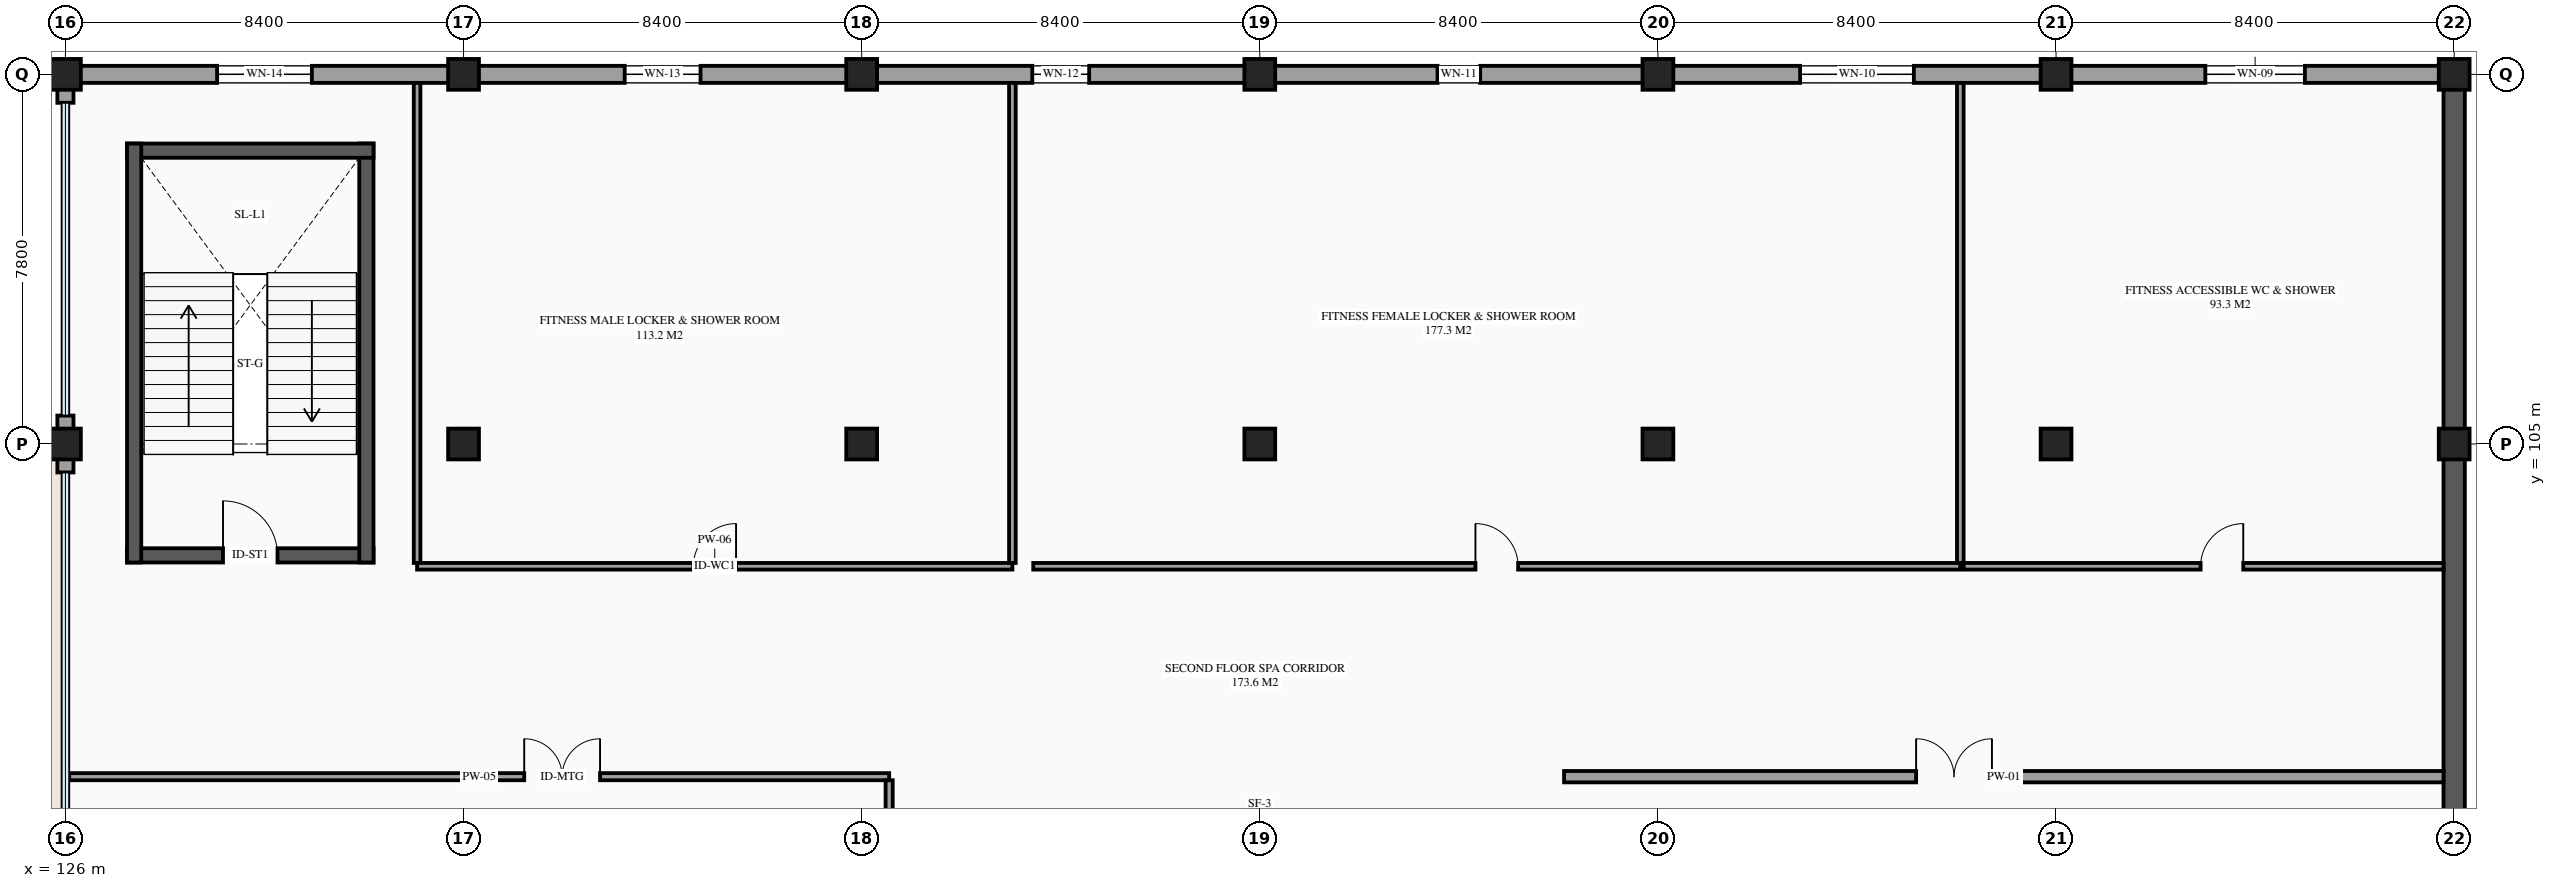
"""IFC4 building model, lengths in metres.
Left out: names, types, materials, properties, quantities, classifications, styles, units other than length and angle.
Written with IfcOpenShell. Run it as: python <this file> out.ifc"""

import sys

from ifc_helpers import new_model, si_unit, direction, frame, frame_2d, origin, origin_2d, place, context, subcontext, project, spatial, rectangle, extrude, element, fill, save


model = new_model("IFC4")
c1 = context("Model", 3, precision=1e-05, world=origin(), true_north=direction((0.0, 1.0)))
c2 = subcontext(c1, "Body", "Model", "MODEL_VIEW")
j1 = project(units=[si_unit("LENGTHUNIT", "METRE"), si_unit("PLANEANGLEUNIT", "RADIAN")], contexts=[c1])
p1 = place(None, origin())
s1 = spatial("IfcSite", under=j1, at=p1, CompositionType="ELEMENT")
p2 = place(p1, origin())
s2 = spatial("IfcBuilding", under=s1, at=p2, CompositionType="ELEMENT")
p3 = place(p2, frame((0.0, 0.0, 9.9)))
s3 = spatial("IfcBuildingStorey", under=s2, at=p3, CompositionType="ELEMENT", Elevation=9.9)
for number, where, z_axis, x_axis in (
    (1, (126.0, 105.0, 0.0), (0.0, 0.0, 1.0), (1.0, 0.0, 0.0)),
    (2, (126.0, 112.8, 0.0), (0.0, 0.0, 1.0), (1.0, 0.0, 0.0)),
    (3, (134.4, 105.0, 0.0), (0.0, 0.0, 1.0), (1.0, 0.0, 0.0)),
    (4, (134.4, 112.8, 0.0), (0.0, 0.0, 1.0), (1.0, 0.0, 0.0)),
    (5, (142.8, 105.0, 0.0), (0.0, 0.0, 1.0), (1.0, 0.0, 0.0)),
    (6, (142.8, 112.8, 0.0), (0.0, 0.0, 1.0), (1.0, 0.0, 0.0)),
    (7, (151.2, 105.0, 0.0), (0.0, 0.0, 1.0), (1.0, 0.0, 0.0)),
    (8, (151.2, 112.8, 0.0), (0.0, 0.0, 1.0), (1.0, 0.0, 0.0)),
    (9, (159.6, 105.0, 0.0), (0.0, 0.0, 1.0), (1.0, 0.0, 0.0)),
    (10, (159.6, 112.8, 0.0), (0.0, 0.0, 1.0), (1.0, 0.0, 0.0)),
    (11, (168.0, 105.0, 0.0), (0.0, 0.0, 1.0), (1.0, 0.0, 0.0)),
    (12, (168.0, 112.8, 0.0), (0.0, 0.0, 1.0), (1.0, 0.0, 0.0)),
    (13, (176.4, 105.0, 0.0), (0.0, 0.0, 1.0), (1.0, 0.0, 0.0)),
    (14, (176.4, 112.8, 0.0), (0.0, 0.0, 1.0), (1.0, 0.0, 0.0)),
):
    element("IfcColumn", number, at=place(p3, frame(where, z_axis=z_axis, x_axis=x_axis)), inside=s3, PredefinedType="COLUMN", context=c2, shape_type="SweptSolid", body=[
        extrude(rectangle(XDim=0.65, YDim=0.65, at=origin_2d()), origin(), (0.0, 0.0, 1.0), 4.2),
    ])
p4 = place(p3, frame((176.4, 96.6, 0.0), z_axis=(0.0, 0.0, 1.0), x_axis=(0.0, 1.0, 0.0)))
e15 = element("IfcWall", 15, at=p4, inside=s3, PredefinedType="STANDARD", context=c2, shape_type="SweptSolid", body=[
    extrude(rectangle(XDim=8.4, YDim=0.45, at=frame_2d((4.2, 0.0))), origin(), (0.0, 0.0, 1.0), 4.2),
])
p5 = place(p3, frame((176.4, 105.0, 0.0), z_axis=(0.0, 0.0, 1.0), x_axis=(0.0, 1.0, 0.0)))
e16 = element("IfcWall", 16, at=p5, inside=s3, PredefinedType="STANDARD", context=c2, shape_type="SweptSolid", body=[
    extrude(rectangle(XDim=7.8, YDim=0.45, at=frame_2d((3.9, 0.0))), origin(), (0.0, 0.0, 1.0), 4.2),
])
p6 = place(p3, frame((176.4, 112.8, 0.0), z_axis=(0.0, 0.0, 1.0), x_axis=(-1.0, 0.0, 0.0)))
e17 = element("IfcWall", 17, at=p6, inside=s3, PredefinedType="STANDARD", context=c2, shape_type="SweptSolid", body=[
    extrude(rectangle(XDim=8.4, YDim=0.36, at=frame_2d((4.2, 0.0))), origin(), (0.0, 0.0, 1.0), 3.427),
])
p7 = place(p6, frame((3.15, 0.0, 0.8)))
e18 = element("IfcOpeningElement", 18, at=p7, cuts=e17, PredefinedType="OPENING", context=c2, shape_type="SweptSolid", body=[
    extrude(rectangle(XDim=2.1, YDim=1.5, at=frame_2d((1.05, 0.75))), frame((0.0, 0.19, 0.0), z_axis=(0.0, -1.0, 0.0), x_axis=(1.0, 0.0, 0.0)), (0.0, 0.0, 1.0), 0.38),
])
p8 = place(p3, frame((168.0, 112.8, 0.0), z_axis=(0.0, 0.0, 1.0), x_axis=(-1.0, 0.0, 0.0)))
e19 = element("IfcWall", 19, at=p8, inside=s3, PredefinedType="STANDARD", context=c2, shape_type="SweptSolid", body=[
    extrude(rectangle(XDim=8.4, YDim=0.36, at=frame_2d((4.2, 0.0))), origin(), (0.0, 0.0, 1.0), 3.65),
])
p9 = place(p8, frame((3.0, 0.0, 0.8)))
e20 = element("IfcOpeningElement", 20, at=p9, cuts=e19, PredefinedType="OPENING", context=c2, shape_type="SweptSolid", body=[
    extrude(rectangle(XDim=2.4, YDim=1.5, at=frame_2d((1.2, 0.75))), frame((0.0, 0.19, 0.0), z_axis=(0.0, -1.0, 0.0), x_axis=(1.0, 0.0, 0.0)), (0.0, 0.0, 1.0), 0.38),
])
p10 = place(p3, frame((159.6, 112.8, 0.0), z_axis=(0.0, 0.0, 1.0), x_axis=(-1.0, 0.0, 0.0)))
e21 = element("IfcWall", 21, at=p10, inside=s3, PredefinedType="STANDARD", context=c2, shape_type="SweptSolid", body=[
    extrude(rectangle(XDim=8.4, YDim=0.36, at=frame_2d((4.2, 0.0))), origin(), (0.0, 0.0, 1.0), 3.01),
])
p11 = place(p10, frame((3.75, 0.0, 0.8)))
e22 = element("IfcOpeningElement", 22, at=p11, cuts=e21, PredefinedType="OPENING", context=c2, shape_type="SweptSolid", body=[
    extrude(rectangle(XDim=0.9, YDim=1.5, at=frame_2d((0.45, 0.75))), frame((0.0, 0.19, 0.0), z_axis=(0.0, -1.0, 0.0), x_axis=(1.0, 0.0, 0.0)), (0.0, 0.0, 1.0), 0.38),
])
p12 = place(p3, frame((151.2, 112.8, 0.0), z_axis=(0.0, 0.0, 1.0), x_axis=(-1.0, 0.0, 0.0)))
e23 = element("IfcWall", 23, at=p12, inside=s3, PredefinedType="STANDARD", context=c2, shape_type="SweptSolid", body=[
    extrude(rectangle(XDim=8.4, YDim=0.36, at=frame_2d((4.2, 0.0))), origin(), (0.0, 0.0, 1.0), 3.606),
])
p13 = place(p12, frame((3.6, 0.0, 0.8)))
e24 = element("IfcOpeningElement", 24, at=p13, cuts=e23, PredefinedType="OPENING", context=c2, shape_type="SweptSolid", body=[
    extrude(rectangle(XDim=1.2, YDim=1.5, at=frame_2d((0.6, 0.75))), frame((0.0, 0.19, 0.0), z_axis=(0.0, -1.0, 0.0), x_axis=(1.0, 0.0, 0.0)), (0.0, 0.0, 1.0), 0.38),
])
p14 = place(p3, frame((142.8, 112.8, 0.0), z_axis=(0.0, 0.0, 1.0), x_axis=(-1.0, 0.0, 0.0)))
e25 = element("IfcWall", 25, at=p14, inside=s3, PredefinedType="STANDARD", context=c2, shape_type="SweptSolid", body=[
    extrude(rectangle(XDim=8.4, YDim=0.36, at=frame_2d((4.2, 0.0))), origin(), (0.0, 0.0, 1.0), 3.655),
])
p15 = place(p14, frame((3.4, 0.0, 0.8)))
e26 = element("IfcOpeningElement", 26, at=p15, cuts=e25, PredefinedType="OPENING", context=c2, shape_type="SweptSolid", body=[
    extrude(rectangle(XDim=1.6, YDim=1.5, at=frame_2d((0.8, 0.75))), frame((0.0, 0.19, 0.0), z_axis=(0.0, -1.0, 0.0), x_axis=(1.0, 0.0, 0.0)), (0.0, 0.0, 1.0), 0.38),
])
p16 = place(p3, frame((134.4, 112.8, 0.0), z_axis=(0.0, 0.0, 1.0), x_axis=(-1.0, 0.0, 0.0)))
e27 = element("IfcWall", 27, at=p16, inside=s3, PredefinedType="STANDARD", context=c2, shape_type="SweptSolid", body=[
    extrude(rectangle(XDim=8.4, YDim=0.36, at=frame_2d((4.2, 0.0))), origin(), (0.0, 0.0, 1.0), 3.31),
])
p17 = place(p16, frame((3.2, 0.0, 0.8)))
e28 = element("IfcOpeningElement", 28, at=p17, cuts=e27, PredefinedType="OPENING", context=c2, shape_type="SweptSolid", body=[
    extrude(rectangle(XDim=2.0, YDim=1.5, at=frame_2d((1.0, 0.75))), frame((0.0, 0.19, 0.0), z_axis=(0.0, -1.0, 0.0), x_axis=(1.0, 0.0, 0.0)), (0.0, 0.0, 1.0), 0.38),
])
p18 = place(p3, frame((126.0, 105.0, 0.0), z_axis=(0.0, 0.0, 1.0), x_axis=(0.0, -1.0, 0.0)))
e29 = element("IfcWall", 29, at=p18, inside=s3, PredefinedType="STANDARD", context=c2, shape_type="SweptSolid", body=[
    extrude(rectangle(XDim=0.6, YDim=0.34, at=frame_2d((0.3, 0.0))), origin(), (0.0, 0.0, 1.0), 4.2),
])
p19 = place(p3, frame((126.0, 112.62, 0.0), z_axis=(0.0, 0.0, 1.0), x_axis=(0.0, -1.0, 0.0)))
e30 = element("IfcWall", 30, at=p19, inside=s3, PredefinedType="STANDARD", context=c2, shape_type="SweptSolid", body=[
    extrude(rectangle(XDim=0.42, YDim=0.34, at=frame_2d((0.21, 0.0))), origin(), (0.0, 0.0, 1.0), 4.2),
])
p20 = place(p3, frame((126.0, 105.6, 0.0), z_axis=(0.0, 0.0, 1.0), x_axis=(0.0, -1.0, 0.0)))
e31 = element("IfcWall", 31, at=p20, inside=s3, PredefinedType="STANDARD", context=c2, shape_type="SweptSolid", body=[
    extrude(rectangle(XDim=0.6, YDim=0.34, at=frame_2d((0.3, 0.0))), origin(), (0.0, 0.0, 1.0), 4.2),
])
p21 = place(p3, frame((127.3, 102.65, 0.0), z_axis=(0.0, 0.0, 1.0), x_axis=(1.0, 0.0, 0.0)))
e32 = element("IfcWall", 32, at=p21, inside=s3, PredefinedType="SHEAR", context=c2, shape_type="SweptSolid", body=[
    extrude(rectangle(XDim=5.2, YDim=0.3, at=frame_2d((2.6, 0.0))), origin(), (0.0, 0.0, 1.0), 4.2),
])
p22 = place(p21, frame((2.025, 0.0, 0.0)))
e33 = element("IfcOpeningElement", 33, at=p22, cuts=e32, PredefinedType="OPENING", context=c2, shape_type="SweptSolid", body=[
    extrude(rectangle(XDim=1.15, YDim=2.15, at=frame_2d((0.575, 1.075))), frame((0.0, 0.16, 0.0), z_axis=(0.0, -1.0, 0.0), x_axis=(1.0, 0.0, 0.0)), (0.0, 0.0, 1.0), 0.32),
])
p23 = place(p3, frame((132.35, 102.5, 0.0), z_axis=(0.0, 0.0, 1.0), x_axis=(0.0, 1.0, 0.0)))
e34 = element("IfcWall", 34, at=p23, inside=s3, PredefinedType="SHEAR", context=c2, shape_type="SweptSolid", body=[
    extrude(rectangle(XDim=8.84, YDim=0.3, at=frame_2d((4.42, 0.0))), origin(), (0.0, 0.0, 1.0), 4.2),
])
p24 = place(p3, frame((132.5, 111.19, 0.0), z_axis=(0.0, 0.0, 1.0), x_axis=(-1.0, 0.0, 0.0)))
e35 = element("IfcWall", 35, at=p24, inside=s3, PredefinedType="SHEAR", context=c2, shape_type="SweptSolid", body=[
    extrude(rectangle(XDim=5.2, YDim=0.3, at=frame_2d((2.6, 0.0))), origin(), (0.0, 0.0, 1.0), 4.2),
])
p25 = place(p3, frame((127.45, 111.34, 0.0), z_axis=(0.0, 0.0, 1.0), x_axis=(0.0, -1.0, 0.0)))
e36 = element("IfcWall", 36, at=p25, inside=s3, PredefinedType="SHEAR", context=c2, shape_type="SweptSolid", body=[
    extrude(rectangle(XDim=8.84, YDim=0.3, at=frame_2d((4.42, 0.0))), origin(), (0.0, 0.0, 1.0), 4.2),
])
p26 = place(p3, frame((126.08, 97.98, 0.0), z_axis=(0.0, 0.0, 1.0), x_axis=(1.0, 0.0, 0.0)))
e37 = element("IfcWall", 37, at=p26, inside=s3, PredefinedType="PARTITIONING", context=c2, shape_type="SweptSolid", body=[
    extrude(rectangle(XDim=17.3, YDim=0.15, at=frame_2d((8.65, 0.0))), origin(), (0.0, 0.0, 1.0), 3.955),
])
p27 = place(p26, frame((9.6, 0.0, 0.0)))
e38 = element("IfcOpeningElement", 38, at=p27, cuts=e37, PredefinedType="OPENING", context=c2, shape_type="SweptSolid", body=[
    extrude(rectangle(XDim=1.6, YDim=2.25, at=frame_2d((0.8, 1.125))), frame((0.0, 0.085, 0.0), z_axis=(0.0, -1.0, 0.0), x_axis=(1.0, 0.0, 0.0)), (0.0, 0.0, 1.0), 0.17),
])
p28 = place(p3, frame((143.38, 80.42, 0.0), z_axis=(0.0, 0.0, 1.0), x_axis=(0.0, 1.0, 0.0)))
e39 = element("IfcWall", 39, at=p28, inside=s3, PredefinedType="PARTITIONING", context=c2, shape_type="SweptSolid", body=[
    extrude(rectangle(XDim=17.485, YDim=0.15, at=frame_2d((8.743, 0.0))), origin(), (0.0, 0.0, 1.0), 3.955),
])
p29 = place(p3, frame((157.62, 97.98, 0.0), z_axis=(0.0, 0.0, 1.0), x_axis=(1.0, 0.0, 0.0)))
e40 = element("IfcWall", 40, at=p29, inside=s3, PredefinedType="PARTITIONING", context=c2, shape_type="SweptSolid", body=[
    extrude(rectangle(XDim=18.555, YDim=0.24, at=frame_2d((9.277, 0.0))), origin(), (0.0, 0.0, 1.0), 3.955),
])
p30 = place(p29, frame((7.427, 0.0, 0.0)))
e41 = element("IfcOpeningElement", 41, at=p30, cuts=e40, PredefinedType="OPENING", context=c2, shape_type="SweptSolid", body=[
    extrude(rectangle(XDim=1.6, YDim=2.25, at=frame_2d((0.8, 1.125))), frame((0.0, 0.13, 0.0), z_axis=(0.0, -1.0, 0.0), x_axis=(1.0, 0.0, 0.0)), (0.0, 0.0, 1.0), 0.26),
])
p31 = place(p3, frame((133.42, 102.42, 0.0), z_axis=(0.0, 0.0, 1.0), x_axis=(1.0, 0.0, 0.0)))
e42 = element("IfcWall", 42, at=p31, inside=s3, PredefinedType="PARTITIONING", context=c2, shape_type="SweptSolid", body=[
    extrude(rectangle(XDim=12.56, YDim=0.14, at=frame_2d((6.28, 0.0))), origin(), (0.0, 0.0, 1.0), 3.955),
])
p32 = place(p31, frame((5.83, 0.0, 0.0)))
e43 = element("IfcOpeningElement", 43, at=p32, cuts=e42, PredefinedType="OPENING", context=c2, shape_type="SweptSolid", body=[
    extrude(rectangle(XDim=0.9, YDim=2.12, at=frame_2d((0.45, 1.06))), frame((0.0, 0.08, 0.0), z_axis=(0.0, -1.0, 0.0), x_axis=(1.0, 0.0, 0.0)), (0.0, 0.0, 1.0), 0.16),
])
for number, where, z_axis, x_axis in (
    (44, (133.42, 102.49, 0.0), (0.0, 0.0, 1.0), (0.0, 1.0, 0.0)),
    (45, (145.98, 102.49, 0.0), (0.0, 0.0, 1.0), (0.0, 1.0, 0.0)),
):
    element("IfcWall", number, at=place(p3, frame(where, z_axis=z_axis, x_axis=x_axis)), inside=s3, PredefinedType="PARTITIONING", context=c2, shape_type="SweptSolid", body=[
        extrude(rectangle(XDim=10.13, YDim=0.14, at=frame_2d((5.065, 0.0))), origin(), (0.0, 0.0, 1.0), 3.955),
    ])
p33 = place(p3, frame((146.42, 102.42, 0.0), z_axis=(0.0, 0.0, 1.0), x_axis=(1.0, 0.0, 0.0)))
e46 = element("IfcWall", 46, at=p33, inside=s3, PredefinedType="PARTITIONING", context=c2, shape_type="SweptSolid", body=[
    extrude(rectangle(XDim=19.56, YDim=0.14, at=frame_2d((9.78, 0.0))), origin(), (0.0, 0.0, 1.0), 3.955),
])
p34 = place(p33, frame((9.33, 0.0, 0.0)))
e47 = element("IfcOpeningElement", 47, at=p34, cuts=e46, PredefinedType="OPENING", context=c2, shape_type="SweptSolid", body=[
    extrude(rectangle(XDim=0.9, YDim=2.12, at=frame_2d((0.45, 1.06))), frame((0.0, 0.08, 0.0), z_axis=(0.0, -1.0, 0.0), x_axis=(1.0, 0.0, 0.0)), (0.0, 0.0, 1.0), 0.16),
])
p35 = place(p3, frame((165.98, 102.49, 0.0), z_axis=(0.0, 0.0, 1.0), x_axis=(0.0, 1.0, 0.0)))
e48 = element("IfcWall", 48, at=p35, inside=s3, PredefinedType="PARTITIONING", context=c2, shape_type="SweptSolid", body=[
    extrude(rectangle(XDim=10.13, YDim=0.14, at=frame_2d((5.065, 0.0))), origin(), (0.0, 0.0, 1.0), 3.955),
])
p36 = place(p3, frame((166.05, 102.42, 0.0), z_axis=(0.0, 0.0, 1.0), x_axis=(1.0, 0.0, 0.0)))
e49 = element("IfcWall", 49, at=p36, inside=s3, PredefinedType="PARTITIONING", context=c2, shape_type="SweptSolid", body=[
    extrude(rectangle(XDim=10.125, YDim=0.14, at=frame_2d((5.062, 0.0))), origin(), (0.0, 0.0, 1.0), 3.955),
])
p37 = place(p36, frame((5.0, 0.0, 0.0)))
e50 = element("IfcOpeningElement", 50, at=p37, cuts=e49, PredefinedType="OPENING", context=c2, shape_type="SweptSolid", body=[
    extrude(rectangle(XDim=0.9, YDim=2.12, at=frame_2d((0.45, 1.06))), frame((0.0, 0.08, 0.0), z_axis=(0.0, -1.0, 0.0), x_axis=(1.0, 0.0, 0.0)), (0.0, 0.0, 1.0), 0.16),
])
p38 = place(p7, origin())
e51 = element("IfcWindow", 51, at=p38, inside=s3, PartitioningType="SINGLE_PANEL", PredefinedType="WINDOW", context=c2, shape_type="SweptSolid", body=[
    extrude(rectangle(XDim=2.1, YDim=1.5, at=frame_2d((1.05, 0.75))), frame((0.0, 0.03, 0.0), z_axis=(0.0, -1.0, 0.0), x_axis=(1.0, 0.0, 0.0)), (0.0, 0.0, 1.0), 0.06),
])
fill(e18, e51)
p39 = place(p9, origin())
e52 = element("IfcWindow", 52, at=p39, inside=s3, PartitioningType="SINGLE_PANEL", PredefinedType="WINDOW", context=c2, shape_type="SweptSolid", body=[
    extrude(rectangle(XDim=2.4, YDim=1.5, at=frame_2d((1.2, 0.75))), frame((0.0, 0.03, 0.0), z_axis=(0.0, -1.0, 0.0), x_axis=(1.0, 0.0, 0.0)), (0.0, 0.0, 1.0), 0.06),
])
fill(e20, e52)
p40 = place(p11, origin())
e53 = element("IfcWindow", 53, at=p40, inside=s3, PartitioningType="SINGLE_PANEL", PredefinedType="WINDOW", context=c2, shape_type="SweptSolid", body=[
    extrude(rectangle(XDim=0.9, YDim=1.5, at=frame_2d((0.45, 0.75))), frame((0.0, 0.03, 0.0), z_axis=(0.0, -1.0, 0.0), x_axis=(1.0, 0.0, 0.0)), (0.0, 0.0, 1.0), 0.06),
])
fill(e22, e53)
p41 = place(p13, origin())
e54 = element("IfcWindow", 54, at=p41, inside=s3, PartitioningType="SINGLE_PANEL", PredefinedType="WINDOW", context=c2, shape_type="SweptSolid", body=[
    extrude(rectangle(XDim=1.2, YDim=1.5, at=frame_2d((0.6, 0.75))), frame((0.0, 0.03, 0.0), z_axis=(0.0, -1.0, 0.0), x_axis=(1.0, 0.0, 0.0)), (0.0, 0.0, 1.0), 0.06),
])
fill(e24, e54)
p42 = place(p15, origin())
e55 = element("IfcWindow", 55, at=p42, inside=s3, PartitioningType="SINGLE_PANEL", PredefinedType="WINDOW", context=c2, shape_type="SweptSolid", body=[
    extrude(rectangle(XDim=1.6, YDim=1.5, at=frame_2d((0.8, 0.75))), frame((0.0, 0.03, 0.0), z_axis=(0.0, -1.0, 0.0), x_axis=(1.0, 0.0, 0.0)), (0.0, 0.0, 1.0), 0.06),
])
fill(e26, e55)
p43 = place(p17, origin())
e56 = element("IfcWindow", 56, at=p43, inside=s3, PartitioningType="SINGLE_PANEL", PredefinedType="WINDOW", context=c2, shape_type="SweptSolid", body=[
    extrude(rectangle(XDim=2.0, YDim=1.5, at=frame_2d((1.0, 0.75))), frame((0.0, 0.03, 0.0), z_axis=(0.0, -1.0, 0.0), x_axis=(1.0, 0.0, 0.0)), (0.0, 0.0, 1.0), 0.06),
])
fill(e28, e56)
p44 = place(p22, origin())
e57 = element("IfcDoor", 57, at=p44, inside=s3, OperationType="SINGLE_SWING_LEFT", PredefinedType="DOOR", context=c2, shape_type="SweptSolid", body=[
    extrude(rectangle(XDim=1.15, YDim=2.15, at=frame_2d((0.575, 1.075))), frame((0.0, 0.025, 0.0), z_axis=(0.0, -1.0, 0.0), x_axis=(1.0, 0.0, 0.0)), (0.0, 0.0, 1.0), 0.05),
])
fill(e33, e57)
p45 = place(p27, origin())
e58 = element("IfcDoor", 58, at=p45, inside=s3, OperationType="DOUBLE_DOOR_SINGLE_SWING", PredefinedType="DOOR", context=c2, shape_type="SweptSolid", body=[
    extrude(rectangle(XDim=1.6, YDim=2.25, at=frame_2d((0.8, 1.125))), frame((0.0, 0.025, 0.0), z_axis=(0.0, -1.0, 0.0), x_axis=(1.0, 0.0, 0.0)), (0.0, 0.0, 1.0), 0.05),
])
fill(e38, e58)
p46 = place(p30, origin())
e59 = element("IfcDoor", 59, at=p46, inside=s3, OperationType="DOUBLE_DOOR_SINGLE_SWING", PredefinedType="DOOR", context=c2, shape_type="SweptSolid", body=[
    extrude(rectangle(XDim=1.6, YDim=2.25, at=frame_2d((0.8, 1.125))), frame((0.0, 0.025, 0.0), z_axis=(0.0, -1.0, 0.0), x_axis=(1.0, 0.0, 0.0)), (0.0, 0.0, 1.0), 0.05),
])
fill(e41, e59)
p47 = place(p32, origin())
e60 = element("IfcDoor", 60, at=p47, inside=s3, OperationType="SINGLE_SWING_RIGHT", PredefinedType="DOOR", context=c2, shape_type="SweptSolid", body=[
    extrude(rectangle(XDim=0.9, YDim=2.12, at=frame_2d((0.45, 1.06))), frame((0.0, 0.025, 0.0), z_axis=(0.0, -1.0, 0.0), x_axis=(1.0, 0.0, 0.0)), (0.0, 0.0, 1.0), 0.05),
])
fill(e43, e60)
p48 = place(p34, origin())
e61 = element("IfcDoor", 61, at=p48, inside=s3, OperationType="SINGLE_SWING_LEFT", PredefinedType="DOOR", context=c2, shape_type="SweptSolid", body=[
    extrude(rectangle(XDim=0.9, YDim=2.12, at=frame_2d((0.45, 1.06))), frame((0.0, 0.025, 0.0), z_axis=(0.0, -1.0, 0.0), x_axis=(1.0, 0.0, 0.0)), (0.0, 0.0, 1.0), 0.05),
])
fill(e47, e61)
p49 = place(p37, origin())
e62 = element("IfcDoor", 62, at=p49, inside=s3, OperationType="SINGLE_SWING_RIGHT", PredefinedType="DOOR", context=c2, shape_type="SweptSolid", body=[
    extrude(rectangle(XDim=0.9, YDim=2.12, at=frame_2d((0.45, 1.06))), frame((0.0, 0.025, 0.0), z_axis=(0.0, -1.0, 0.0), x_axis=(1.0, 0.0, 0.0)), (0.0, 0.0, 1.0), 0.05),
])
fill(e50, e62)
save(model, sys.argv[1])
